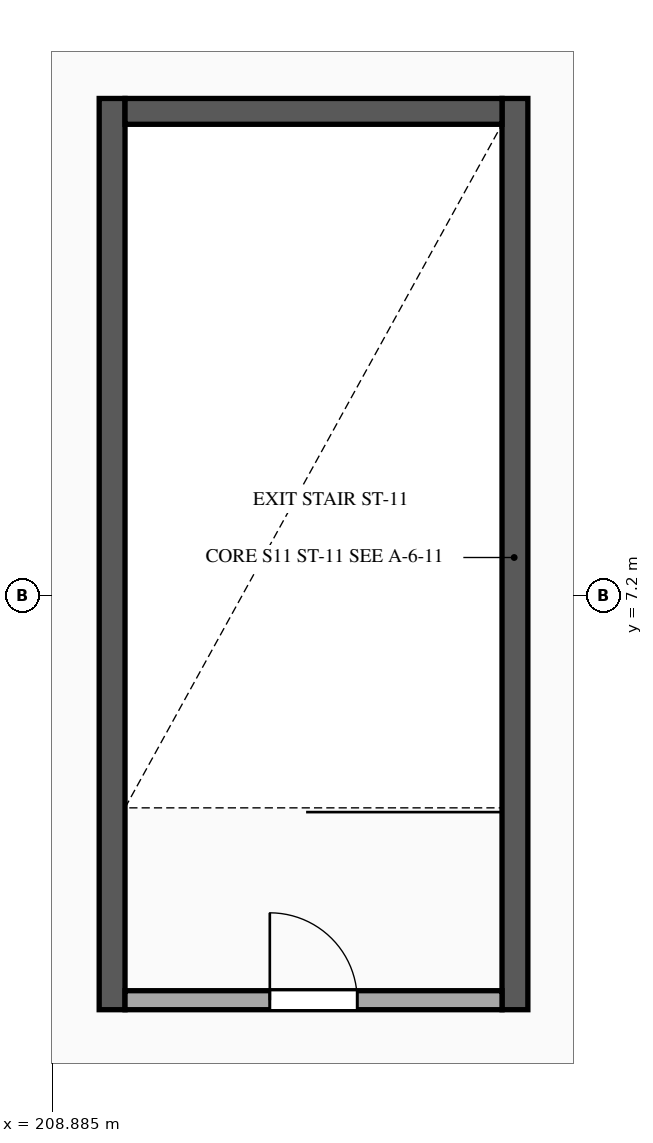
"""IFC4 building model, lengths in metres.
Left out: names, types, materials, properties, quantities, classifications, styles, units other than length and angle.
Written with IfcOpenShell. Run it as: python <this file> out.ifc"""

import sys

from ifc_helpers import new_model, si_unit, direction, frame, frame_2d, origin, place, context, subcontext, project, spatial, rectangle, extrude, element, fill, save


model = new_model("IFC4")
c1 = context("Model", 3, precision=1e-05, world=origin(), true_north=direction((0.0, 1.0)))
c2 = subcontext(c1, "Body", "Model", "MODEL_VIEW")
j1 = project(units=[si_unit("LENGTHUNIT", "METRE"), si_unit("PLANEANGLEUNIT", "RADIAN")], contexts=[c1])
p1 = place(None, origin())
s1 = spatial("IfcSite", under=j1, at=p1, CompositionType="ELEMENT")
p2 = place(p1, origin())
s2 = spatial("IfcBuilding", under=s1, at=p2, CompositionType="ELEMENT")
p3 = place(p2, frame((0.0, 0.0, 10.8)))
s3 = spatial("IfcBuildingStorey", under=s2, at=p3, CompositionType="ELEMENT", Elevation=10.8)
for number, where, z_axis, x_axis in (
    (1, (209.67, 1.75, 0.0), (0.0, 0.0, 1.0), (0.0, 1.0, 0.0)),
    (2, (214.97, 13.74, 0.0), (0.0, 0.0, 1.0), (0.0, -1.0, 0.0)),
):
    element("IfcWall", number, at=place(p3, frame(where, z_axis=z_axis, x_axis=x_axis)), inside=s3, PredefinedType="SHEAR", context=c2, shape_type="SweptSolid", body=[
        extrude(rectangle(XDim=11.99, YDim=0.34, at=frame_2d((5.995, 0.0))), origin(), (0.0, 0.0, 1.0), 4.26),
    ])
p4 = place(p3, frame((209.84, 13.57, 0.0), z_axis=(0.0, 0.0, 1.0), x_axis=(1.0, 0.0, 0.0)))
e3 = element("IfcWall", 3, at=p4, inside=s3, PredefinedType="SHEAR", context=c2, shape_type="SweptSolid", body=[
    extrude(rectangle(XDim=4.96, YDim=0.34, at=frame_2d((2.48, 0.0))), origin(), (0.0, 0.0, 1.0), 4.26),
])
p5 = place(p3, frame((209.84, 1.875, 0.0), z_axis=(0.0, 0.0, 1.0), x_axis=(1.0, 0.0, 0.0)))
e4 = element("IfcWall", 4, at=p5, inside=s3, PredefinedType="STANDARD", context=c2, shape_type="SweptSolid", body=[
    extrude(rectangle(XDim=4.96, YDim=0.25, at=frame_2d((2.48, 0.0))), origin(), (0.0, 0.0, 1.0), 4.22),
])
p6 = place(p5, frame((1.905, 0.0, 0.0)))
e5 = element("IfcOpeningElement", 5, at=p6, cuts=e4, PredefinedType="OPENING", context=c2, shape_type="SweptSolid", body=[
    extrude(rectangle(XDim=1.15, YDim=2.2, at=frame_2d((0.575, 1.1))), frame((0.0, 0.135, 0.0), z_axis=(0.0, -1.0, 0.0), x_axis=(1.0, 0.0, 0.0)), (0.0, 0.0, 1.0), 0.27),
])
p7 = place(p6, origin())
e6 = element("IfcDoor", 6, at=p7, inside=s3, OperationType="SINGLE_SWING_LEFT", PredefinedType="DOOR", context=c2, shape_type="SweptSolid", body=[
    extrude(rectangle(XDim=1.15, YDim=2.2, at=frame_2d((0.575, 1.1))), frame((0.0, 0.025, 0.0), z_axis=(0.0, -1.0, 0.0), x_axis=(1.0, 0.0, 0.0)), (0.0, 0.0, 1.0), 0.05),
])
fill(e5, e6)
save(model, sys.argv[1])
